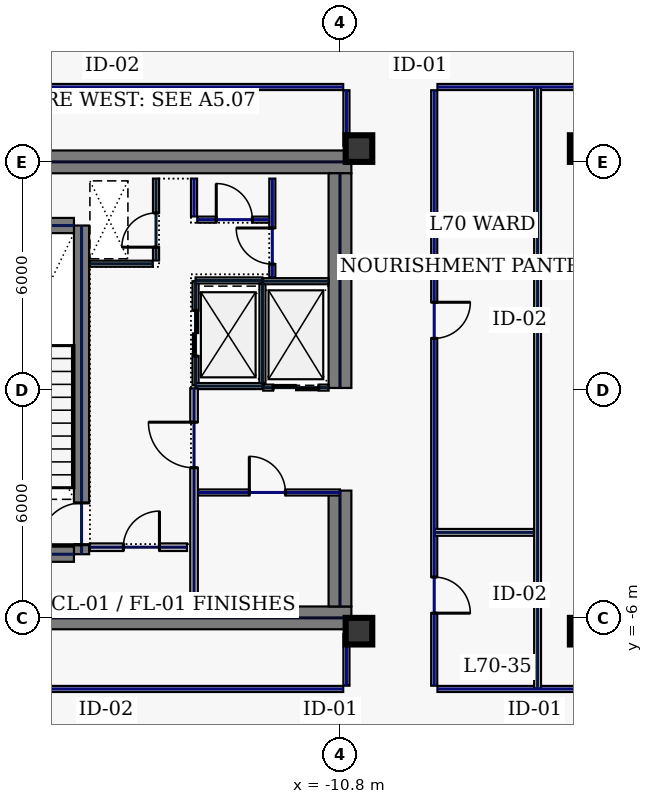
"""IFC4 building model, lengths in metres.
Left out: names, types, materials, properties, quantities, classifications, styles, units other than length and angle.
Written with IfcOpenShell. Run it as: python <this file> out.ifc"""

import sys

from ifc_helpers import new_model, si_unit, direction, frame, frame_2d, origin, origin_2d, place, context, subcontext, project, spatial, rectangle, hollow_rectangle, extrude, element, fill, save


model = new_model("IFC4")
c1 = context("Model", 3, precision=1e-05, world=origin(), true_north=direction((0.0, 1.0)))
c2 = subcontext(c1, "Body", "Model", "MODEL_VIEW")
j1 = project(units=[si_unit("LENGTHUNIT", "METRE"), si_unit("PLANEANGLEUNIT", "RADIAN")], contexts=[c1])
p1 = place(None, origin())
s1 = spatial("IfcSite", under=j1, at=p1, CompositionType="ELEMENT")
p2 = place(p1, origin())
s2 = spatial("IfcBuilding", under=s1, at=p2, CompositionType="ELEMENT")
p3 = place(p2, frame((0.0, 0.0, 301.0)))
s3 = spatial("IfcBuildingStorey", under=s2, at=p3, CompositionType="ELEMENT", Elevation=301.0)
for number, where, z_axis, x_axis in (
    (1, (-22.0, 6.0, 0.0), (0.0, 0.0, 1.0), (1.0, 0.0, 0.0)),
    (2, (-22.0, -6.0, 0.0), (0.0, 0.0, 1.0), (1.0, 0.0, 0.0)),
):
    element("IfcWall", number, at=place(p3, frame(where, z_axis=z_axis, x_axis=x_axis)), inside=s3, PredefinedType="SHEAR", context=c2, shape_type="SweptSolid", body=[
        extrude(rectangle(XDim=11.5, YDim=0.6, at=frame_2d((5.75, 0.0))), origin(), (0.0, 0.0, 1.0), 3.74),
    ])
p4 = place(p3, frame((-10.8, -5.7, 0.0), z_axis=(0.0, 0.0, 1.0), x_axis=(0.0, 1.0, 0.0)))
e3 = element("IfcWall", 3, at=p4, inside=s3, PredefinedType="SHEAR", context=c2, shape_type="SweptSolid", body=[
    extrude(rectangle(XDim=3.05, YDim=0.6, at=frame_2d((1.525, 0.0))), origin(), (0.0, 0.0, 1.0), 3.74),
])
p5 = place(p3, frame((-10.8, 0.05, 0.0), z_axis=(0.0, 0.0, 1.0), x_axis=(0.0, 1.0, 0.0)))
e4 = element("IfcWall", 4, at=p5, inside=s3, PredefinedType="SHEAR", context=c2, shape_type="SweptSolid", body=[
    extrude(rectangle(XDim=5.65, YDim=0.6, at=frame_2d((2.825, 0.0))), origin(), (0.0, 0.0, 1.0), 3.74),
])
p6 = place(p3, frame((-17.6, -4.325, 0.0), z_axis=(0.0, 0.0, 1.0), x_axis=(0.0, 1.0, 0.0)))
e5 = element("IfcWall", 5, at=p6, inside=s3, PredefinedType="SHEAR", context=c2, shape_type="SweptSolid", body=[
    extrude(rectangle(XDim=8.65, YDim=0.4, at=frame_2d((4.325, 0.0))), origin(), (0.0, 0.0, 1.0), 3.74),
])
p7 = place(p6, frame((0.25, 0.0, 0.0)))
e6 = element("IfcOpeningElement", 6, at=p7, cuts=e5, PredefinedType="OPENING", context=c2, shape_type="SweptSolid", body=[
    extrude(rectangle(XDim=1.1, YDim=2.2, at=frame_2d((0.55, 1.1))), frame((0.0, 0.21, 0.0), z_axis=(0.0, -1.0, 0.0), x_axis=(1.0, 0.0, 0.0)), (0.0, 0.0, 1.0), 0.42),
])
for number, where, z_axis, x_axis in (
    (7, (-21.2, -4.325, 0.0), (0.0, 0.0, 1.0), (1.0, 0.0, 0.0)),
    (8, (-21.2, 4.325, 0.0), (0.0, 0.0, 1.0), (1.0, 0.0, 0.0)),
):
    element("IfcWall", number, at=place(p3, frame(where, z_axis=z_axis, x_axis=x_axis)), inside=s3, PredefinedType="SHEAR", context=c2, shape_type="SweptSolid", body=[
        extrude(rectangle(XDim=3.4, YDim=0.4, at=frame_2d((1.7, 0.0))), origin(), (0.0, 0.0, 1.0), 3.74),
    ])
for number, where, z_axis, x_axis in (
    (9, (-10.3, -6.35, 0.0), (0.0, 0.0, 1.0), (1.0, 0.0, 0.0)),
    (10, (-10.3, 6.35, 0.0), (0.0, 0.0, 1.0), (1.0, 0.0, 0.0)),
    (11, (-4.4, -6.35, 0.0), (0.0, 0.0, 1.0), (1.0, 0.0, 0.0)),
    (12, (-4.4, 6.35, 0.0), (0.0, 0.0, 1.0), (1.0, 0.0, 0.0)),
):
    element("IfcColumn", number, at=place(p3, frame(where, z_axis=z_axis, x_axis=x_axis)), inside=s3, PredefinedType="COLUMN", context=c2, shape_type="SweptSolid", body=[
        extrude(hollow_rectangle(XDim=0.7, YDim=0.7, WallThickness=0.032, at=origin_2d()), origin(), (0.0, 0.0, 1.0), 3.74),
    ])
p8 = place(p3, frame((-14.6, 0.12, 0.0), z_axis=(0.0, 0.0, 1.0), x_axis=(0.0, 1.0, 0.0)))
e13 = element("IfcWall", 13, at=p8, inside=s3, PredefinedType="PARTITIONING", context=c2, shape_type="SweptSolid", body=[
    extrude(rectangle(XDim=2.74, YDim=0.16, at=frame_2d((1.37, 0.0))), origin(), (0.0, 0.0, 1.0), 3.74),
])
p9 = place(p8, frame((0.77, 0.0, 0.0)))
e14 = element("IfcOpeningElement", 14, at=p9, cuts=e13, PredefinedType="OPENING", context=c2, shape_type="SweptSolid", body=[
    extrude(rectangle(XDim=1.2, YDim=2.2, at=frame_2d((0.6, 1.1))), frame((0.0, 0.09, 0.0), z_axis=(0.0, -1.0, 0.0), x_axis=(1.0, 0.0, 0.0)), (0.0, 0.0, 1.0), 0.18),
])
for number, where, z_axis, x_axis in (
    (15, (-14.6, 0.1, 0.0), (0.0, 0.0, 1.0), (1.0, 0.0, 0.0)),
    (16, (-14.6, 2.88, 0.0), (0.0, 0.0, 1.0), (1.0, 0.0, 0.0)),
):
    element("IfcWall", number, at=place(p3, frame(where, z_axis=z_axis, x_axis=x_axis)), inside=s3, PredefinedType="PARTITIONING", context=c2, shape_type="SweptSolid", body=[
        extrude(rectangle(XDim=1.76, YDim=0.16, at=frame_2d((0.88, 0.0))), origin(), (0.0, 0.0, 1.0), 3.74),
    ])
p10 = place(p3, frame((-12.84, 0.18, 0.0), z_axis=(0.0, 0.0, 1.0), x_axis=(0.0, 1.0, 0.0)))
e17 = element("IfcWall", 17, at=p10, inside=s3, PredefinedType="PARTITIONING", context=c2, shape_type="SweptSolid", body=[
    extrude(rectangle(XDim=2.62, YDim=0.16, at=frame_2d((1.31, 0.0))), origin(), (0.0, 0.0, 1.0), 3.74),
])
p11 = place(p3, frame((-12.82, 0.06, 0.0), z_axis=(0.0, 0.0, 1.0), x_axis=(1.0, 0.0, 0.0)))
e18 = element("IfcWall", 18, at=p11, inside=s3, PredefinedType="PARTITIONING", context=c2, shape_type="SweptSolid", body=[
    extrude(rectangle(XDim=1.72, YDim=0.16, at=frame_2d((0.86, 0.0))), origin(), (0.0, 0.0, 1.0), 3.74),
])
p12 = place(p11, frame((0.26, 0.0, 0.0)))
e19 = element("IfcOpeningElement", 19, at=p12, cuts=e18, PredefinedType="OPENING", context=c2, shape_type="SweptSolid", body=[
    extrude(rectangle(XDim=1.2, YDim=2.2, at=frame_2d((0.6, 1.1))), frame((0.0, 0.09, 0.0), z_axis=(0.0, -1.0, 0.0), x_axis=(1.0, 0.0, 0.0)), (0.0, 0.0, 1.0), 0.18),
])
p13 = place(p3, frame((-12.82, 2.86, 0.0), z_axis=(0.0, 0.0, 1.0), x_axis=(1.0, 0.0, 0.0)))
e20 = element("IfcWall", 20, at=p13, inside=s3, PredefinedType="PARTITIONING", context=c2, shape_type="SweptSolid", body=[
    extrude(rectangle(XDim=1.72, YDim=0.16, at=frame_2d((0.86, 0.0))), origin(), (0.0, 0.0, 1.0), 3.74),
])
p14 = place(p3, frame((-15.64, 3.405, 0.0), z_axis=(0.0, 0.0, 1.0), x_axis=(0.0, 1.0, 0.0)))
e21 = element("IfcWall", 21, at=p14, inside=s3, PredefinedType="PARTITIONING", context=c2, shape_type="SweptSolid", body=[
    extrude(rectangle(XDim=2.155, YDim=0.16, at=frame_2d((1.078, 0.0))), origin(), (0.0, 0.0, 1.0), 3.74),
])
p15 = place(p14, frame((0.35, 0.0, 0.0)))
e22 = element("IfcOpeningElement", 22, at=p15, cuts=e21, PredefinedType="OPENING", context=c2, shape_type="SweptSolid", body=[
    extrude(rectangle(XDim=0.9, YDim=2.2, at=frame_2d((0.45, 1.1))), frame((0.0, 0.09, 0.0), z_axis=(0.0, -1.0, 0.0), x_axis=(1.0, 0.0, 0.0)), (0.0, 0.0, 1.0), 0.18),
])
p16 = place(p3, frame((-17.38, 3.32, 0.0), z_axis=(0.0, 0.0, 1.0), x_axis=(1.0, 0.0, 0.0)))
e23 = element("IfcWall", 23, at=p16, inside=s3, PredefinedType="PARTITIONING", context=c2, shape_type="SweptSolid", body=[
    extrude(rectangle(XDim=1.655, YDim=0.16, at=frame_2d((0.827, 0.0))), origin(), (0.0, 0.0, 1.0), 3.74),
])
p17 = place(p3, frame((-17.38, -4.14, 0.0), z_axis=(0.0, 0.0, 1.0), x_axis=(1.0, 0.0, 0.0)))
e24 = element("IfcWall", 24, at=p17, inside=s3, PredefinedType="SOLIDWALL", context=c2, shape_type="SweptSolid", body=[
    extrude(rectangle(XDim=2.555, YDim=0.2, at=frame_2d((1.277, 0.0))), origin(), (0.0, 0.0, 1.0), 3.74),
])
p18 = place(p17, frame((0.88, 0.0, 0.0)))
e25 = element("IfcOpeningElement", 25, at=p18, cuts=e24, PredefinedType="OPENING", context=c2, shape_type="SweptSolid", body=[
    extrude(rectangle(XDim=0.95, YDim=2.2, at=frame_2d((0.475, 1.1))), frame((0.0, 0.11, 0.0), z_axis=(0.0, -1.0, 0.0), x_axis=(1.0, 0.0, 0.0)), (0.0, 0.0, 1.0), 0.22),
])
p19 = place(p3, frame((-14.535, -2.7, 0.0), z_axis=(0.0, 0.0, 1.0), x_axis=(1.0, 0.0, 0.0)))
e26 = element("IfcWall", 26, at=p19, inside=s3, PredefinedType="PARTITIONING", context=c2, shape_type="SweptSolid", body=[
    extrude(rectangle(XDim=3.735, YDim=0.16, at=frame_2d((1.867, 0.0))), origin(), (0.0, 0.0, 1.0), 3.74),
])
p20 = place(p19, frame((1.35, 0.0, 0.0)))
e27 = element("IfcOpeningElement", 27, at=p20, cuts=e26, PredefinedType="OPENING", context=c2, shape_type="SweptSolid", body=[
    extrude(rectangle(XDim=0.95, YDim=2.2, at=frame_2d((0.475, 1.1))), frame((0.0, 0.09, 0.0), z_axis=(0.0, -1.0, 0.0), x_axis=(1.0, 0.0, 0.0)), (0.0, 0.0, 1.0), 0.18),
])
p21 = place(p3, frame((-12.58, 2.96, 0.0), z_axis=(0.0, 0.0, 1.0), x_axis=(0.0, 1.0, 0.0)))
e28 = element("IfcWall", 28, at=p21, inside=s3, PredefinedType="PARTITIONING", context=c2, shape_type="SweptSolid", body=[
    extrude(rectangle(XDim=2.6, YDim=0.16, at=frame_2d((1.3, 0.0))), origin(), (0.0, 0.0, 1.0), 3.74),
])
p22 = place(p21, frame((0.35, 0.0, 0.0)))
e29 = element("IfcOpeningElement", 29, at=p22, cuts=e28, PredefinedType="OPENING", context=c2, shape_type="SweptSolid", body=[
    extrude(rectangle(XDim=0.95, YDim=2.2, at=frame_2d((0.475, 1.1))), frame((0.0, 0.09, 0.0), z_axis=(0.0, -1.0, 0.0), x_axis=(1.0, 0.0, 0.0)), (0.0, 0.0, 1.0), 0.18),
])
p23 = place(p3, frame((-14.555, 4.48, 0.0), z_axis=(0.0, 0.0, 1.0), x_axis=(1.0, 0.0, 0.0)))
e30 = element("IfcWall", 30, at=p23, inside=s3, PredefinedType="PARTITIONING", context=c2, shape_type="SweptSolid", body=[
    extrude(rectangle(XDim=1.89, YDim=0.16, at=frame_2d((0.945, 0.0))), origin(), (0.0, 0.0, 1.0), 3.74),
])
p24 = place(p23, frame((0.5, 0.0, 0.0)))
e31 = element("IfcOpeningElement", 31, at=p24, cuts=e30, PredefinedType="OPENING", context=c2, shape_type="SweptSolid", body=[
    extrude(rectangle(XDim=0.95, YDim=2.2, at=frame_2d((0.475, 1.1))), frame((0.0, 0.09, 0.0), z_axis=(0.0, -1.0, 0.0), x_axis=(1.0, 0.0, 0.0)), (0.0, 0.0, 1.0), 0.18),
])
p25 = place(p3, frame((-14.64, 4.565, 0.0), z_axis=(0.0, 0.0, 1.0), x_axis=(0.0, 1.0, 0.0)))
e32 = element("IfcWall", 32, at=p25, inside=s3, PredefinedType="PARTITIONING", context=c2, shape_type="SweptSolid", body=[
    extrude(rectangle(XDim=0.995, YDim=0.16, at=frame_2d((0.498, 0.0))), origin(), (0.0, 0.0, 1.0), 3.74),
])
p26 = place(p3, frame((-14.64, -5.56, 0.0), z_axis=(0.0, 0.0, 1.0), x_axis=(0.0, 1.0, 0.0)))
e33 = element("IfcWall", 33, at=p26, inside=s3, PredefinedType="SOLIDWALL", context=c2, shape_type="SweptSolid", body=[
    extrude(rectangle(XDim=5.6, YDim=0.2, at=frame_2d((2.8, 0.0))), origin(), (0.0, 0.0, 1.0), 3.74),
])
p27 = place(p26, frame((3.51, 0.0, 0.0)))
e34 = element("IfcOpeningElement", 34, at=p27, cuts=e33, PredefinedType="OPENING", context=c2, shape_type="SweptSolid", body=[
    extrude(rectangle(XDim=1.2, YDim=2.2, at=frame_2d((0.6, 1.1))), frame((0.0, 0.11, 0.0), z_axis=(0.0, -1.0, 0.0), x_axis=(1.0, 0.0, 0.0)), (0.0, 0.0, 1.0), 0.22),
])
p28 = place(p3, frame((-3.965, 7.97, 0.0), z_axis=(0.0, 0.0, 1.0), x_axis=(-1.0, 0.0, 0.0)))
e35 = element("IfcWall", 35, at=p28, inside=s3, PredefinedType="PARTITIONING", context=c2, shape_type="SweptSolid", body=[
    extrude(rectangle(XDim=4.27, YDim=0.16, at=frame_2d((2.135, 0.0))), origin(), (0.0, 0.0, 1.0), 3.74),
])
p29 = place(p3, frame((-8.32, 7.885, 0.0), z_axis=(0.0, 0.0, 1.0), x_axis=(0.0, -1.0, 0.0)))
e36 = element("IfcWall", 36, at=p29, inside=s3, PredefinedType="PARTITIONING", context=c2, shape_type="SweptSolid", body=[
    extrude(rectangle(XDim=15.67, YDim=0.16, at=frame_2d((7.835, 0.0))), origin(), (0.0, 0.0, 1.0), 3.74),
])
p30 = place(p29, frame((12.811, 0.0, 0.0)))
e37 = element("IfcOpeningElement", 37, at=p30, cuts=e36, PredefinedType="OPENING", context=c2, shape_type="SweptSolid", body=[
    extrude(rectangle(XDim=0.95, YDim=2.2, at=frame_2d((0.475, 1.1))), frame((0.0, 0.09, 0.0), z_axis=(0.0, -1.0, 0.0), x_axis=(1.0, 0.0, 0.0)), (0.0, 0.0, 1.0), 0.18),
])
p31 = place(p29, frame((5.579, 0.0, 0.0)))
e38 = element("IfcOpeningElement", 38, at=p31, cuts=e36, PredefinedType="OPENING", context=c2, shape_type="SweptSolid", body=[
    extrude(rectangle(XDim=0.95, YDim=2.2, at=frame_2d((0.475, 1.1))), frame((0.0, 0.09, 0.0), z_axis=(0.0, -1.0, 0.0), x_axis=(1.0, 0.0, 0.0)), (0.0, 0.0, 1.0), 0.18),
])
p32 = place(p3, frame((-8.235, -7.87, 0.0), z_axis=(0.0, 0.0, 1.0), x_axis=(1.0, 0.0, 0.0)))
e39 = element("IfcWall", 39, at=p32, inside=s3, PredefinedType="PARTITIONING", context=c2, shape_type="SweptSolid", body=[
    extrude(rectangle(XDim=4.27, YDim=0.16, at=frame_2d((2.135, 0.0))), origin(), (0.0, 0.0, 1.0), 3.74),
])
p33 = place(p3, frame((-10.63, -7.785, 0.0), z_axis=(0.0, 0.0, 1.0), x_axis=(0.0, 1.0, 0.0)))
e40 = element("IfcWall", 40, at=p33, inside=s3, PredefinedType="PARTITIONING", context=c2, shape_type="SweptSolid", body=[
    extrude(rectangle(XDim=1.365, YDim=0.16, at=frame_2d((0.683, 0.0))), origin(), (0.0, 0.0, 1.0), 3.74),
])
p34 = place(p3, frame((-10.63, 6.42, 0.0), z_axis=(0.0, 0.0, 1.0), x_axis=(0.0, 1.0, 0.0)))
e41 = element("IfcWall", 41, at=p34, inside=s3, PredefinedType="PARTITIONING", context=c2, shape_type="SweptSolid", body=[
    extrude(rectangle(XDim=1.465, YDim=0.16, at=frame_2d((0.732, 0.0))), origin(), (0.0, 0.0, 1.0), 3.74),
])
for number, where, z_axis, x_axis in (
    (42, (-10.715, 7.97, 0.0), (0.0, 0.0, 1.0), (-1.0, 0.0, 0.0)),
    (43, (-21.915, -7.87, 0.0), (0.0, 0.0, 1.0), (1.0, 0.0, 0.0)),
):
    element("IfcWall", number, at=place(p3, frame(where, z_axis=z_axis, x_axis=x_axis)), inside=s3, PredefinedType="PARTITIONING", context=c2, shape_type="SweptSolid", body=[
        extrude(rectangle(XDim=11.2, YDim=0.16, at=frame_2d((5.6, 0.0))), origin(), (0.0, 0.0, 1.0), 3.74),
    ])
p35 = place(p3, frame((-5.6, -7.865, 0.0), z_axis=(0.0, 0.0, 1.0), x_axis=(0.0, 1.0, 0.0)))
e44 = element("IfcWall", 44, at=p35, inside=s3, PredefinedType="PARTITIONING", context=c2, shape_type="SweptSolid", body=[
    extrude(rectangle(XDim=15.83, YDim=0.18, at=frame_2d((7.915, 0.0))), origin(), (0.0, 0.0, 1.0), 3.74),
])
p36 = place(p3, frame((-8.315, -3.75, 0.0), z_axis=(0.0, 0.0, 1.0), x_axis=(1.0, 0.0, 0.0)))
e45 = element("IfcWall", 45, at=p36, inside=s3, PredefinedType="PARTITIONING", context=c2, shape_type="SweptSolid", body=[
    extrude(rectangle(XDim=2.62, YDim=0.18, at=frame_2d((1.31, 0.0))), origin(), (0.0, 0.0, 1.0), 3.74),
])
p37 = place(p7, origin())
e46 = element("IfcDoor", 46, at=p37, inside=s3, OperationType="SINGLE_SWING_LEFT", PredefinedType="DOOR", context=c2, shape_type="SweptSolid", body=[
    extrude(rectangle(XDim=1.1, YDim=2.2, at=frame_2d((0.55, 1.1))), frame((0.0, 0.025, 0.0), z_axis=(0.0, -1.0, 0.0), x_axis=(1.0, 0.0, 0.0)), (0.0, 0.0, 1.0), 0.05),
])
fill(e6, e46)
p38 = place(p9, origin())
e47 = element("IfcDoor", 47, at=p38, inside=s3, OperationType="SLIDING_TO_LEFT", PredefinedType="DOOR", context=c2, shape_type="SweptSolid", body=[
    extrude(rectangle(XDim=1.2, YDim=2.2, at=frame_2d((0.6, 1.1))), frame((0.0, 0.025, 0.0), z_axis=(0.0, -1.0, 0.0), x_axis=(1.0, 0.0, 0.0)), (0.0, 0.0, 1.0), 0.05),
])
fill(e14, e47)
p39 = place(p12, origin())
e48 = element("IfcDoor", 48, at=p39, inside=s3, OperationType="SLIDING_TO_LEFT", PredefinedType="DOOR", context=c2, shape_type="SweptSolid", body=[
    extrude(rectangle(XDim=1.2, YDim=2.2, at=frame_2d((0.6, 1.1))), frame((0.0, 0.025, 0.0), z_axis=(0.0, -1.0, 0.0), x_axis=(1.0, 0.0, 0.0)), (0.0, 0.0, 1.0), 0.05),
])
fill(e19, e48)
p40 = place(p15, origin())
e49 = element("IfcDoor", 49, at=p40, inside=s3, OperationType="SINGLE_SWING_LEFT", PredefinedType="DOOR", context=c2, shape_type="SweptSolid", body=[
    extrude(rectangle(XDim=0.9, YDim=2.2, at=frame_2d((0.45, 1.1))), frame((0.0, 0.025, 0.0), z_axis=(0.0, -1.0, 0.0), x_axis=(1.0, 0.0, 0.0)), (0.0, 0.0, 1.0), 0.05),
])
fill(e22, e49)
p41 = place(p18, origin())
e50 = element("IfcDoor", 50, at=p41, inside=s3, OperationType="SINGLE_SWING_RIGHT", PredefinedType="DOOR", context=c2, shape_type="SweptSolid", body=[
    extrude(rectangle(XDim=0.95, YDim=2.2, at=frame_2d((0.475, 1.1))), frame((0.0, 0.025, 0.0), z_axis=(0.0, -1.0, 0.0), x_axis=(1.0, 0.0, 0.0)), (0.0, 0.0, 1.0), 0.05),
])
fill(e25, e50)
p42 = place(p20, origin())
e51 = element("IfcDoor", 51, at=p42, inside=s3, OperationType="SINGLE_SWING_LEFT", PredefinedType="DOOR", context=c2, shape_type="SweptSolid", body=[
    extrude(rectangle(XDim=0.95, YDim=2.2, at=frame_2d((0.475, 1.1))), frame((0.0, 0.025, 0.0), z_axis=(0.0, -1.0, 0.0), x_axis=(1.0, 0.0, 0.0)), (0.0, 0.0, 1.0), 0.05),
])
fill(e27, e51)
p43 = place(p22, origin())
e52 = element("IfcDoor", 52, at=p43, inside=s3, OperationType="SINGLE_SWING_RIGHT", PredefinedType="DOOR", context=c2, shape_type="SweptSolid", body=[
    extrude(rectangle(XDim=0.95, YDim=2.2, at=frame_2d((0.475, 1.1))), frame((0.0, 0.025, 0.0), z_axis=(0.0, -1.0, 0.0), x_axis=(1.0, 0.0, 0.0)), (0.0, 0.0, 1.0), 0.05),
])
fill(e29, e52)
p44 = place(p24, origin())
e53 = element("IfcDoor", 53, at=p44, inside=s3, OperationType="SINGLE_SWING_LEFT", PredefinedType="DOOR", context=c2, shape_type="SweptSolid", body=[
    extrude(rectangle(XDim=0.95, YDim=2.2, at=frame_2d((0.475, 1.1))), frame((0.0, 0.025, 0.0), z_axis=(0.0, -1.0, 0.0), x_axis=(1.0, 0.0, 0.0)), (0.0, 0.0, 1.0), 0.05),
])
fill(e31, e53)
p45 = place(p27, origin())
e54 = element("IfcDoor", 54, at=p45, inside=s3, OperationType="SINGLE_SWING_RIGHT", PredefinedType="DOOR", context=c2, shape_type="SweptSolid", body=[
    extrude(rectangle(XDim=1.2, YDim=2.2, at=frame_2d((0.6, 1.1))), frame((0.0, 0.025, 0.0), z_axis=(0.0, -1.0, 0.0), x_axis=(1.0, 0.0, 0.0)), (0.0, 0.0, 1.0), 0.05),
])
fill(e34, e54)
p46 = place(p30, origin())
e55 = element("IfcDoor", 55, at=p46, inside=s3, OperationType="SINGLE_SWING_RIGHT", PredefinedType="DOOR", context=c2, shape_type="SweptSolid", body=[
    extrude(rectangle(XDim=0.95, YDim=2.2, at=frame_2d((0.475, 1.1))), frame((0.0, 0.025, 0.0), z_axis=(0.0, -1.0, 0.0), x_axis=(1.0, 0.0, 0.0)), (0.0, 0.0, 1.0), 0.05),
])
fill(e37, e55)
p47 = place(p31, origin())
e56 = element("IfcDoor", 56, at=p47, inside=s3, OperationType="SINGLE_SWING_LEFT", PredefinedType="DOOR", context=c2, shape_type="SweptSolid", body=[
    extrude(rectangle(XDim=0.95, YDim=2.2, at=frame_2d((0.475, 1.1))), frame((0.0, 0.025, 0.0), z_axis=(0.0, -1.0, 0.0), x_axis=(1.0, 0.0, 0.0)), (0.0, 0.0, 1.0), 0.05),
])
fill(e38, e56)
save(model, sys.argv[1])
